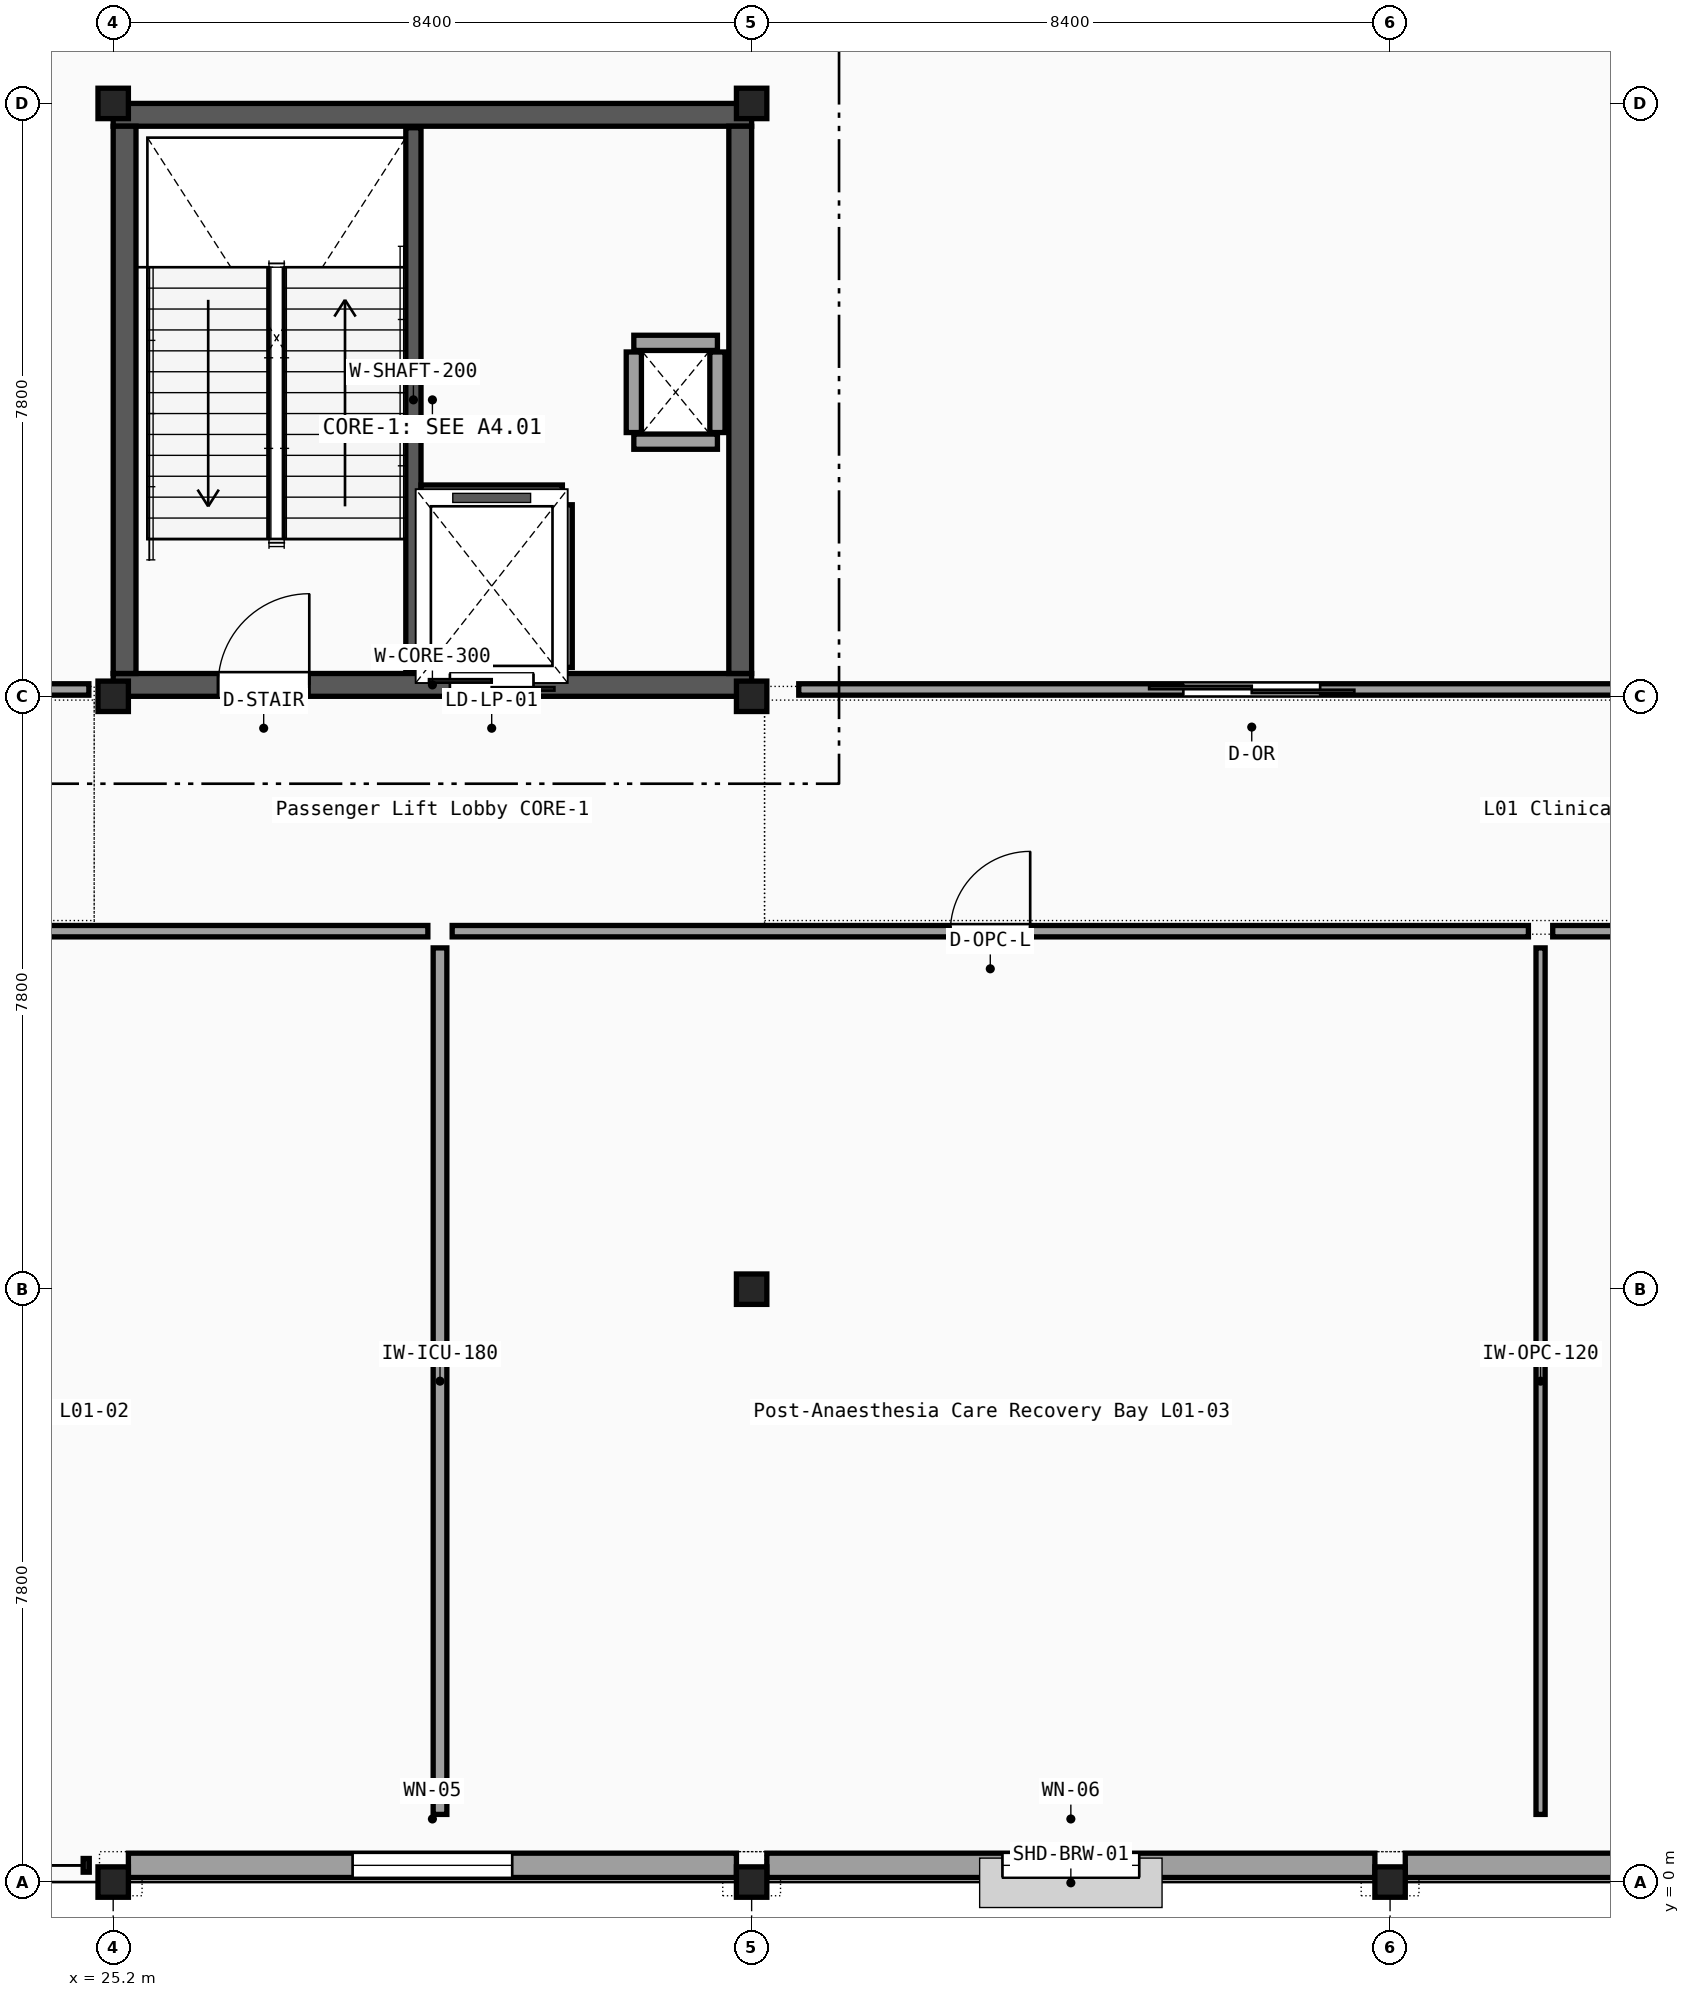
"""IFC4 building model, lengths in metres.
Left out: names, types, materials, properties, quantities, classifications, styles, units other than length and angle.
Written with IfcOpenShell. Run it as: python <this file> out.ifc"""

import sys

from ifc_helpers import new_model, si_unit, direction, frame, frame_2d, origin, origin_2d, place, context, subcontext, project, spatial, rectangle, i_section, extrude, element, fill, save


model = new_model("IFC4")
c1 = context("Model", 3, precision=1e-05, world=origin(), true_north=direction((0.0, 1.0)))
c2 = subcontext(c1, "Body", "Model", "MODEL_VIEW")
j1 = project(units=[si_unit("LENGTHUNIT", "METRE"), si_unit("PLANEANGLEUNIT", "RADIAN")], contexts=[c1])
p1 = place(None, origin())
s1 = spatial("IfcSite", under=j1, at=p1, CompositionType="ELEMENT")
p2 = place(p1, origin())
s2 = spatial("IfcBuilding", under=s1, at=p2, CompositionType="ELEMENT")
p3 = place(p2, frame((0.0, 0.0, 5.1)))
s3 = spatial("IfcBuildingStorey", under=s2, at=p3, CompositionType="ELEMENT", Elevation=5.1)
for number, where, z_axis, x_axis in (
    (1, (25.2, 0.0, 0.0), (0.0, 0.0, 1.0), (1.0, 0.0, 0.0)),
    (2, (25.2, 15.6, 0.0), (0.0, 0.0, 1.0), (1.0, 0.0, 0.0)),
    (3, (25.2, 23.4, 0.0), (0.0, 0.0, 1.0), (1.0, 0.0, 0.0)),
    (4, (33.6, 0.0, 0.0), (0.0, 0.0, 1.0), (1.0, 0.0, 0.0)),
    (5, (33.6, 7.8, 0.0), (0.0, 0.0, 1.0), (1.0, 0.0, 0.0)),
    (6, (33.6, 15.6, 0.0), (0.0, 0.0, 1.0), (1.0, 0.0, 0.0)),
    (7, (33.6, 23.4, 0.0), (0.0, 0.0, 1.0), (1.0, 0.0, 0.0)),
    (8, (42.0, 0.0, 0.0), (0.0, 0.0, 1.0), (1.0, 0.0, 0.0)),
):
    element("IfcColumn", number, at=place(p3, frame(where, z_axis=z_axis, x_axis=x_axis)), inside=s3, PredefinedType="COLUMN", context=c2, shape_type="SweptSolid", body=[
        extrude(i_section(OverallWidth=0.3, OverallDepth=0.4, WebThickness=0.013, FlangeThickness=0.024, FilletRadius=0.027, at=origin_2d()), origin(), (0.0, 0.0, 1.0), 5.1),
    ])
p4 = place(p3, frame((25.4, 0.22, 0.0), z_axis=(0.0, 0.0, 1.0), x_axis=(1.0, 0.0, 0.0)))
e9 = element("IfcWall", 9, at=p4, inside=s3, PredefinedType="SOLIDWALL", context=c2, shape_type="SweptSolid", body=[
    extrude(rectangle(XDim=8.0, YDim=0.32, at=frame_2d((4.0, 0.0))), origin(), (0.0, 0.0, 1.0), 4.43),
])
p5 = place(p4, frame((2.95, 0.0, 0.95)))
e10 = element("IfcOpeningElement", 10, at=p5, cuts=e9, PredefinedType="OPENING", context=c2, shape_type="SweptSolid", body=[
    extrude(rectangle(XDim=2.1, YDim=1.5, at=frame_2d((1.05, 0.75))), frame((0.0, 0.17, 0.0), z_axis=(0.0, -1.0, 0.0), x_axis=(1.0, 0.0, 0.0)), (0.0, 0.0, 1.0), 0.34),
])
p6 = place(p3, frame((33.8, 0.22, 0.0), z_axis=(0.0, 0.0, 1.0), x_axis=(1.0, 0.0, 0.0)))
e11 = element("IfcWall", 11, at=p6, inside=s3, PredefinedType="SOLIDWALL", context=c2, shape_type="SweptSolid", body=[
    extrude(rectangle(XDim=8.0, YDim=0.32, at=frame_2d((4.0, 0.0))), origin(), (0.0, 0.0, 1.0), 4.43),
])
p7 = place(p6, frame((3.1, 0.0, 1.4)))
e12 = element("IfcOpeningElement", 12, at=p7, cuts=e11, PredefinedType="OPENING", context=c2, shape_type="SweptSolid", body=[
    extrude(rectangle(XDim=1.8, YDim=1.1, at=frame_2d((0.9, 0.55))), frame((0.0, 0.17, 0.0), z_axis=(0.0, -1.0, 0.0), x_axis=(1.0, 0.0, 0.0)), (0.0, 0.0, 1.0), 0.34),
])
p8 = place(p3, frame((42.2, 0.22, 0.0), z_axis=(0.0, 0.0, 1.0), x_axis=(1.0, 0.0, 0.0)))
e13 = element("IfcWall", 13, at=p8, inside=s3, PredefinedType="SOLIDWALL", context=c2, shape_type="SweptSolid", body=[
    extrude(rectangle(XDim=8.0, YDim=0.32, at=frame_2d((4.0, 0.0))), origin(), (0.0, 0.0, 1.0), 4.44),
])
p9 = place(p3, frame((25.2, 15.75, 0.0), z_axis=(0.0, 0.0, 1.0), x_axis=(1.0, 0.0, 0.0)))
e14 = element("IfcWall", 14, at=p9, inside=s3, PredefinedType="SHEAR", context=c2, shape_type="SweptSolid", body=[
    extrude(rectangle(XDim=8.4, YDim=0.3, at=frame_2d((4.2, 0.0))), origin(), (0.0, 0.0, 1.0), 4.85),
])
p10 = place(p9, frame((1.38, 0.0, 0.0)))
e15 = element("IfcOpeningElement", 15, at=p10, cuts=e14, PredefinedType="OPENING", context=c2, shape_type="SweptSolid", body=[
    extrude(rectangle(XDim=1.2, YDim=2.15, at=frame_2d((0.6, 1.075))), frame((0.0, 0.16, 0.0), z_axis=(0.0, -1.0, 0.0), x_axis=(1.0, 0.0, 0.0)), (0.0, 0.0, 1.0), 0.32),
])
p11 = place(p9, frame((4.43, 0.0, 0.0)))
e16 = element("IfcOpeningElement", 16, at=p11, cuts=e14, PredefinedType="OPENING", context=c2, shape_type="SweptSolid", body=[
    extrude(rectangle(XDim=1.1, YDim=2.15, at=frame_2d((0.55, 1.075))), frame((0.0, 0.16, 0.0), z_axis=(0.0, -1.0, 0.0), x_axis=(1.0, 0.0, 0.0)), (0.0, 0.0, 1.0), 0.32),
])
p12 = place(p3, frame((25.2, 23.25, 0.0), z_axis=(0.0, 0.0, 1.0), x_axis=(1.0, 0.0, 0.0)))
e17 = element("IfcWall", 17, at=p12, inside=s3, PredefinedType="SHEAR", context=c2, shape_type="SweptSolid", body=[
    extrude(rectangle(XDim=8.4, YDim=0.3, at=frame_2d((4.2, 0.0))), origin(), (0.0, 0.0, 1.0), 4.85),
])
for number, where, z_axis, x_axis in (
    (18, (25.35, 15.9, 0.0), (0.0, 0.0, 1.0), (0.0, 1.0, 0.0)),
    (19, (33.45, 15.9, 0.0), (0.0, 0.0, 1.0), (0.0, 1.0, 0.0)),
):
    element("IfcWall", number, at=place(p3, frame(where, z_axis=z_axis, x_axis=x_axis)), inside=s3, PredefinedType="SHEAR", context=c2, shape_type="SweptSolid", body=[
        extrude(rectangle(XDim=7.2, YDim=0.3, at=frame_2d((3.6, 0.0))), origin(), (0.0, 0.0, 1.0), 4.85),
    ])
p13 = place(p3, frame((29.15, 15.92, 0.0), z_axis=(0.0, 0.0, 1.0), x_axis=(0.0, 1.0, 0.0)))
e20 = element("IfcWall", 20, at=p13, inside=s3, PredefinedType="SHEAR", context=c2, shape_type="SweptSolid", body=[
    extrude(rectangle(XDim=7.16, YDim=0.2, at=frame_2d((3.58, 0.0))), origin(), (0.0, 0.0, 1.0), 4.85),
])
for number, where, z_axis, x_axis in (
    (21, (32.05, 18.95, 0.0), (0.0, 0.0, 1.0), (1.0, 0.0, 0.0)),
    (22, (32.05, 20.25, 0.0), (0.0, 0.0, 1.0), (1.0, 0.0, 0.0)),
):
    element("IfcWall", number, at=place(p3, frame(where, z_axis=z_axis, x_axis=x_axis)), inside=s3, PredefinedType="PARTITIONING", context=c2, shape_type="SweptSolid", body=[
        extrude(rectangle(XDim=1.1, YDim=0.2, at=frame_2d((0.55, 0.0))), origin(), (0.0, 0.0, 1.0), 4.23),
    ])
for number, where, z_axis, x_axis in (
    (23, (32.05, 19.07, 0.0), (0.0, 0.0, 1.0), (0.0, 1.0, 0.0)),
    (24, (33.15, 19.07, 0.0), (0.0, 0.0, 1.0), (0.0, 1.0, 0.0)),
):
    element("IfcWall", number, at=place(p3, frame(where, z_axis=z_axis, x_axis=x_axis)), inside=s3, PredefinedType="PARTITIONING", context=c2, shape_type="SweptSolid", body=[
        extrude(rectangle(XDim=1.06, YDim=0.2, at=frame_2d((0.53, 0.0))), origin(), (0.0, 0.0, 1.0), 4.23),
    ])
p14 = place(p3, frame((31.14, 15.98, 0.0), z_axis=(0.0, 0.0, 1.0), x_axis=(0.0, 1.0, 0.0)))
e25 = element("IfcWall", 25, at=p14, inside=s3, PredefinedType="PARTITIONING", context=c2, shape_type="SweptSolid", body=[
    extrude(rectangle(XDim=2.14, YDim=0.2, at=frame_2d((1.07, 0.0))), origin(), (0.0, 0.0, 1.0), 4.23),
])
p15 = place(p3, frame((29.25, 18.28, 0.0), z_axis=(0.0, 0.0, 1.0), x_axis=(1.0, 0.0, 0.0)))
e26 = element("IfcWall", 26, at=p15, inside=s3, PredefinedType="PARTITIONING", context=c2, shape_type="SweptSolid", body=[
    extrude(rectangle(XDim=1.86, YDim=0.2, at=frame_2d((0.93, 0.0))), origin(), (0.0, 0.0, 1.0), 4.23),
])
p16 = place(p3, frame((15.18, 12.51, 0.0), z_axis=(0.0, 0.0, 1.0), x_axis=(1.0, 0.0, 0.0)))
e27 = element("IfcWall", 27, at=p16, inside=s3, PredefinedType="PARTITIONING", context=c2, shape_type="SweptSolid", body=[
    extrude(rectangle(XDim=14.16, YDim=0.15, at=frame_2d((7.08, 0.0))), origin(), (0.0, 0.0, 1.0), 4.43),
])
p17 = place(p16, frame((6.23, 0.0, 0.0)))
e28 = element("IfcOpeningElement", 28, at=p17, cuts=e27, PredefinedType="OPENING", context=c2, shape_type="SweptSolid", body=[
    extrude(rectangle(XDim=1.7, YDim=2.3, at=frame_2d((0.85, 1.15))), frame((0.0, 0.085, 0.0), z_axis=(0.0, -1.0, 0.0), x_axis=(1.0, 0.0, 0.0)), (0.0, 0.0, 1.0), 0.17),
])
p18 = place(p3, frame((29.5, 0.89, 0.0), z_axis=(0.0, 0.0, 1.0), x_axis=(0.0, 1.0, 0.0)))
e29 = element("IfcWall", 29, at=p18, inside=s3, PredefinedType="PARTITIONING", context=c2, shape_type="SweptSolid", body=[
    extrude(rectangle(XDim=11.4, YDim=0.18, at=frame_2d((5.7, 0.0))), origin(), (0.0, 0.0, 1.0), 4.33),
])
p19 = place(p3, frame((29.66, 12.51, 0.0), z_axis=(0.0, 0.0, 1.0), x_axis=(1.0, 0.0, 0.0)))
e30 = element("IfcWall", 30, at=p19, inside=s3, PredefinedType="PARTITIONING", context=c2, shape_type="SweptSolid", body=[
    extrude(rectangle(XDim=14.16, YDim=0.15, at=frame_2d((7.08, 0.0))), origin(), (0.0, 0.0, 1.0), 4.43),
])
p20 = place(p19, frame((6.555, 0.0, 0.0)))
e31 = element("IfcOpeningElement", 31, at=p20, cuts=e30, PredefinedType="OPENING", context=c2, shape_type="SweptSolid", body=[
    extrude(rectangle(XDim=1.05, YDim=2.15, at=frame_2d((0.525, 1.075))), frame((0.0, 0.085, 0.0), z_axis=(0.0, -1.0, 0.0), x_axis=(1.0, 0.0, 0.0)), (0.0, 0.0, 1.0), 0.17),
])
p21 = place(p3, frame((43.98, 0.89, 0.0), z_axis=(0.0, 0.0, 1.0), x_axis=(0.0, 1.0, 0.0)))
e32 = element("IfcWall", 32, at=p21, inside=s3, PredefinedType="PARTITIONING", context=c2, shape_type="SweptSolid", body=[
    extrude(rectangle(XDim=11.4, YDim=0.12, at=frame_2d((5.7, 0.0))), origin(), (0.0, 0.0, 1.0), 4.82),
])
p22 = place(p3, frame((44.14, 12.51, 0.0), z_axis=(0.0, 0.0, 1.0), x_axis=(1.0, 0.0, 0.0)))
e33 = element("IfcWall", 33, at=p22, inside=s3, PredefinedType="PARTITIONING", context=c2, shape_type="SweptSolid", body=[
    extrude(rectangle(XDim=14.24, YDim=0.15, at=frame_2d((7.12, 0.0))), origin(), (0.0, 0.0, 1.0), 4.82),
])
p23 = place(p22, frame((6.595, 0.0, 0.0)))
e34 = element("IfcOpeningElement", 34, at=p23, cuts=e33, PredefinedType="OPENING", context=c2, shape_type="SweptSolid", body=[
    extrude(rectangle(XDim=1.05, YDim=2.15, at=frame_2d((0.525, 1.075))), frame((0.0, 0.085, 0.0), z_axis=(0.0, -1.0, 0.0), x_axis=(1.0, 0.0, 0.0)), (0.0, 0.0, 1.0), 0.17),
])
p24 = place(p3, frame((12.91, 15.69, 0.0), z_axis=(0.0, 0.0, 1.0), x_axis=(1.0, 0.0, 0.0)))
e35 = element("IfcWall", 35, at=p24, inside=s3, PredefinedType="PARTITIONING", context=c2, shape_type="SweptSolid", body=[
    extrude(rectangle(XDim=11.97, YDim=0.15, at=frame_2d((5.985, 0.0))), origin(), (0.0, 0.0, 1.0), 4.33),
])
p25 = place(p24, frame((5.46, 0.0, 0.0)))
e36 = element("IfcOpeningElement", 36, at=p25, cuts=e35, PredefinedType="OPENING", context=c2, shape_type="SweptSolid", body=[
    extrude(rectangle(XDim=1.05, YDim=2.15, at=frame_2d((0.525, 1.075))), frame((0.0, 0.085, 0.0), z_axis=(0.0, -1.0, 0.0), x_axis=(1.0, 0.0, 0.0)), (0.0, 0.0, 1.0), 0.17),
])
p26 = place(p3, frame((34.22, 15.69, 0.0), z_axis=(0.0, 0.0, 1.0), x_axis=(1.0, 0.0, 0.0)))
e37 = element("IfcWall", 37, at=p26, inside=s3, PredefinedType="PARTITIONING", context=c2, shape_type="SweptSolid", body=[
    extrude(rectangle(XDim=11.92, YDim=0.15, at=frame_2d((5.96, 0.0))), origin(), (0.0, 0.0, 1.0), 4.82),
])
p27 = place(p26, frame((5.06, 0.0, 0.0)))
e38 = element("IfcOpeningElement", 38, at=p27, cuts=e37, PredefinedType="OPENING", context=c2, shape_type="SweptSolid", body=[
    extrude(rectangle(XDim=1.8, YDim=2.4, at=frame_2d((0.9, 1.2))), frame((0.0, 0.085, 0.0), z_axis=(0.0, -1.0, 0.0), x_axis=(1.0, 0.0, 0.0)), (0.0, 0.0, 1.0), 0.17),
])
p28 = place(p5, origin())
e39 = element("IfcWindow", 39, at=p28, inside=s3, PartitioningType="SINGLE_PANEL", PredefinedType="WINDOW", context=c2, shape_type="SweptSolid", body=[
    extrude(rectangle(XDim=2.1, YDim=1.5, at=frame_2d((1.05, 0.75))), frame((0.0, 0.03, 0.0), z_axis=(0.0, -1.0, 0.0), x_axis=(1.0, 0.0, 0.0)), (0.0, 0.0, 1.0), 0.06),
])
fill(e10, e39)
p29 = place(p7, origin())
e40 = element("IfcWindow", 40, at=p29, inside=s3, PartitioningType="SINGLE_PANEL", PredefinedType="WINDOW", context=c2, shape_type="SweptSolid", body=[
    extrude(rectangle(XDim=1.8, YDim=1.1, at=frame_2d((0.9, 0.55))), frame((0.0, 0.03, 0.0), z_axis=(0.0, -1.0, 0.0), x_axis=(1.0, 0.0, 0.0)), (0.0, 0.0, 1.0), 0.06),
])
fill(e12, e40)
p30 = place(p10, origin())
e41 = element("IfcDoor", 41, at=p30, inside=s3, OperationType="SINGLE_SWING_RIGHT", PredefinedType="DOOR", context=c2, shape_type="SweptSolid", body=[
    extrude(rectangle(XDim=1.2, YDim=2.15, at=frame_2d((0.6, 1.075))), frame((0.0, 0.025, 0.0), z_axis=(0.0, -1.0, 0.0), x_axis=(1.0, 0.0, 0.0)), (0.0, 0.0, 1.0), 0.05),
])
fill(e15, e41)
p31 = place(p11, origin())
e42 = element("IfcDoor", 42, at=p31, inside=s3, OperationType="DOUBLE_DOOR_SLIDING", PredefinedType="DOOR", context=c2, shape_type="SweptSolid", body=[
    extrude(rectangle(XDim=1.1, YDim=2.15, at=frame_2d((0.55, 1.075))), frame((0.0, 0.025, 0.0), z_axis=(0.0, -1.0, 0.0), x_axis=(1.0, 0.0, 0.0)), (0.0, 0.0, 1.0), 0.05),
])
fill(e16, e42)
p32 = place(p20, origin())
e43 = element("IfcDoor", 43, at=p32, inside=s3, OperationType="SINGLE_SWING_RIGHT", PredefinedType="DOOR", context=c2, shape_type="SweptSolid", body=[
    extrude(rectangle(XDim=1.05, YDim=2.15, at=frame_2d((0.525, 1.075))), frame((0.0, 0.025, 0.0), z_axis=(0.0, -1.0, 0.0), x_axis=(1.0, 0.0, 0.0)), (0.0, 0.0, 1.0), 0.05),
])
fill(e31, e43)
p33 = place(p27, origin())
e44 = element("IfcDoor", 44, at=p33, inside=s3, OperationType="DOUBLE_DOOR_SLIDING", PredefinedType="DOOR", context=c2, shape_type="SweptSolid", body=[
    extrude(rectangle(XDim=1.8, YDim=2.4, at=frame_2d((0.9, 1.2))), frame((0.0, 0.025, 0.0), z_axis=(0.0, -1.0, 0.0), x_axis=(1.0, 0.0, 0.0)), (0.0, 0.0, 1.0), 0.05),
])
fill(e38, e44)
save(model, sys.argv[1])
